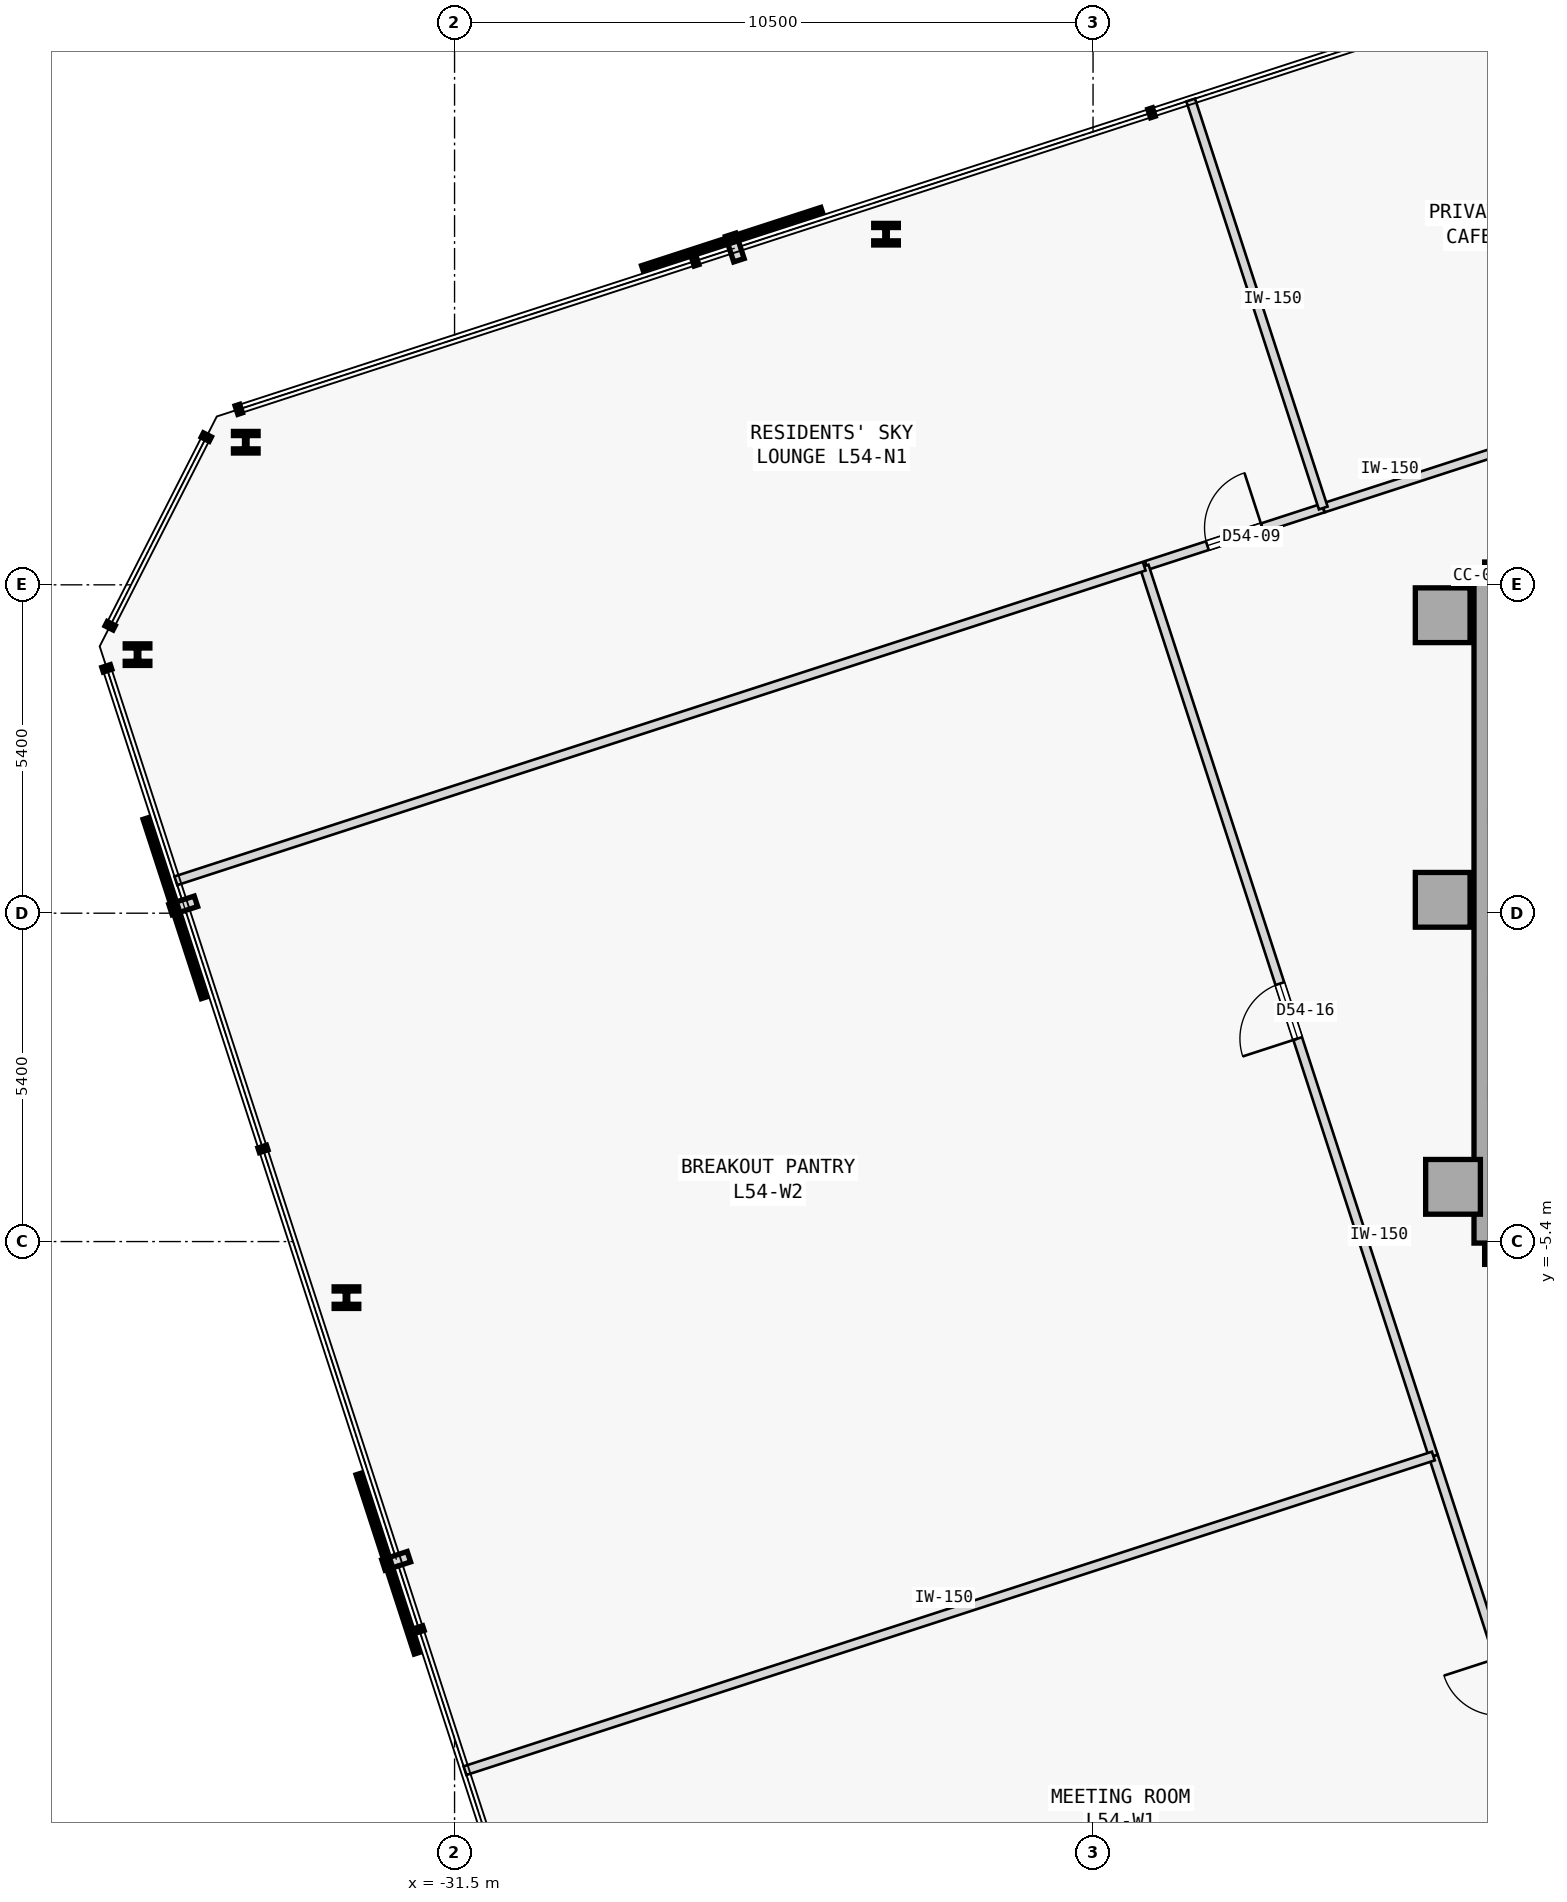
"""IFC4 building model, lengths in metres.
Left out: names, types, materials, properties, quantities, classifications, styles, units other than length and angle.
Written with IfcOpenShell. Run it as: python <this file> out.ifc"""

import sys

from ifc_helpers import new_model, si_unit, direction, frame, frame_2d, origin, origin_2d, place, context, subcontext, project, spatial, rectangle, i_section, extrude, element, fill, save


model = new_model("IFC4")
c1 = context("Model", 3, precision=1e-05, world=origin(), true_north=direction((0.0, 1.0)))
c2 = subcontext(c1, "Body", "Model", "MODEL_VIEW")
j1 = project(units=[si_unit("LENGTHUNIT", "METRE"), si_unit("PLANEANGLEUNIT", "RADIAN")], contexts=[c1])
p1 = place(None, origin())
s1 = spatial("IfcSite", under=j1, at=p1, CompositionType="ELEMENT")
p2 = place(p1, origin())
s2 = spatial("IfcBuilding", under=s1, at=p2, CompositionType="ELEMENT")
p3 = place(p2, frame((0.0, 0.0, 206.8)))
s3 = spatial("IfcBuildingStorey", under=s2, at=p3, CompositionType="ELEMENT", Elevation=206.8)
for number, where, z_axis, x_axis in (
    (1, (-15.25, 4.9, 0.0), (0.0, 0.0, 1.0), (1.0, 0.0, 0.0)),
    (2, (-15.25, 0.22, 0.0), (0.0, 0.0, 1.0), (1.0, 0.0, 0.0)),
    (3, (-15.08, -4.5, 0.0), (0.0, 0.0, 1.0), (1.0, 0.0, 0.0)),
):
    element("IfcColumn", number, at=place(p3, frame(where, z_axis=z_axis, x_axis=x_axis)), inside=s3, PredefinedType="COLUMN", context=c2, shape_type="SweptSolid", body=[
        extrude(rectangle(XDim=0.9, YDim=0.9, at=origin_2d()), origin(), (0.0, 0.0, 1.0), 4.1),
    ])
p4 = place(p3, frame((-14.56, 5.6, 0.0), z_axis=(0.0, 0.0, 1.0), x_axis=(1.0, 0.0, 0.0)))
e4 = element("IfcWall", 4, at=p4, inside=s3, PredefinedType="SHEAR", context=c2, shape_type="SweptSolid", body=[
    extrude(rectangle(XDim=11.41, YDim=0.35, at=frame_2d((5.705, 0.0))), origin(), (0.0, 0.0, 1.0), 3.875),
])
p5 = place(p3, frame((-14.56, -5.6, 0.0), z_axis=(0.0, 0.0, 1.0), x_axis=(1.0, 0.0, 0.0)))
e5 = element("IfcWall", 5, at=p5, inside=s3, PredefinedType="SHEAR", context=c2, shape_type="SweptSolid", body=[
    extrude(rectangle(XDim=10.86, YDim=0.35, at=frame_2d((5.43, 0.0))), origin(), (0.0, 0.0, 1.0), 3.875),
])
p6 = place(p3, frame((-14.56, -5.425, 0.0), z_axis=(0.0, 0.0, 1.0), x_axis=(0.0, 1.0, 0.0)))
e6 = element("IfcWall", 6, at=p6, inside=s3, PredefinedType="SHEAR", context=c2, shape_type="SweptSolid", body=[
    extrude(rectangle(XDim=10.85, YDim=0.35, at=frame_2d((5.425, 0.0))), origin(), (0.0, 0.0, 1.0), 3.875),
])
for number, where, z_axis, x_axis in (
    (7, (-24.404, 11.166, 0.0), (0.0, 0.0, 1.0), (1.0, 0.0, 0.0)),
    (8, (-34.934, 7.745, 0.0), (0.0, 0.0, 1.0), (1.0, 0.0, 0.0)),
    (9, (-36.713, 4.252, 0.0), (0.0, 0.0, 1.0), (1.0, 0.0, 0.0)),
    (10, (-33.278, -6.322, 0.0), (0.0, 0.0, 1.0), (1.0, 0.0, 0.0)),
):
    element("IfcColumn", number, at=place(p3, frame(where, z_axis=z_axis, x_axis=x_axis)), inside=s3, PredefinedType="COLUMN", context=c2, shape_type="SweptSolid", body=[
        extrude(i_section(OverallWidth=0.405, OverallDepth=0.355, WebThickness=0.042, FlangeThickness=0.068, FilletRadius=0.015, at=origin_2d()), origin(), (0.0, 0.0, 1.0), 4.1),
    ])
p7 = place(p3, frame((-20.123, 5.719, 0.0), z_axis=(0.0, 0.0, 1.0), x_axis=(0.95105108089, 0.309033722331, 0.0)))
e11 = element("IfcWall", 11, at=p7, inside=s3, PredefinedType="PARTITIONING", context=c2, shape_type="SweptSolid", body=[
    extrude(rectangle(XDim=3.058, YDim=0.15, at=frame_2d((1.529, 0.0))), origin(), (0.0, 0.0, 1.0), 3.875),
])
p8 = place(p7, frame((1.054, 0.0, 0.0)))
e12 = element("IfcOpeningElement", 12, at=p8, cuts=e11, PredefinedType="OPENING", context=c2, shape_type="SweptSolid", body=[
    extrude(rectangle(XDim=0.95, YDim=2.15, at=frame_2d((0.475, 1.075))), frame((0.0, 0.085, 0.0), z_axis=(0.0, -1.0, 0.0), x_axis=(1.0, 0.0, 0.0)), (0.0, 0.0, 1.0), 0.17),
])
p9 = place(p3, frame((-17.214, 6.664, 0.0), z_axis=(0.0, 0.0, 1.0), x_axis=(0.951056894815, 0.309015829409, 0.0)))
e13 = element("IfcWall", 13, at=p9, inside=s3, PredefinedType="PARTITIONING", context=c2, shape_type="SweptSolid", body=[
    extrude(rectangle(XDim=22.32, YDim=0.15, at=frame_2d((11.16, 0.0))), origin(), (0.0, 0.0, 1.0), 3.875),
])
p10 = place(p9, frame((10.685, 0.0, 0.0)))
e14 = element("IfcOpeningElement", 14, at=p10, cuts=e13, PredefinedType="OPENING", context=c2, shape_type="SweptSolid", body=[
    extrude(rectangle(XDim=0.95, YDim=2.15, at=frame_2d((0.475, 1.075))), frame((0.0, 0.085, 0.0), z_axis=(0.0, -1.0, 0.0), x_axis=(1.0, 0.0, 0.0)), (0.0, 0.0, 1.0), 0.17),
])
p11 = place(p3, frame((-12.954, -16.466, 0.0), z_axis=(0.0, 0.0, 1.0), x_axis=(-0.309039411751, 0.951049232156, 0.0)))
e15 = element("IfcWall", 15, at=p11, inside=s3, PredefinedType="PARTITIONING", context=c2, shape_type="SweptSolid", body=[
    extrude(rectangle(XDim=7.927, YDim=0.15, at=frame_2d((3.963, 0.0))), origin(), (0.0, 0.0, 1.0), 3.875),
])
p12 = place(p11, frame((3.489, 0.0, 0.0)))
e16 = element("IfcOpeningElement", 16, at=p12, cuts=e15, PredefinedType="OPENING", context=c2, shape_type="SweptSolid", body=[
    extrude(rectangle(XDim=0.95, YDim=2.15, at=frame_2d((0.475, 1.075))), frame((0.0, 0.085, 0.0), z_axis=(0.0, -1.0, 0.0), x_axis=(1.0, 0.0, 0.0)), (0.0, 0.0, 1.0), 0.17),
])
p13 = place(p3, frame((-15.404, -8.927, 0.0), z_axis=(0.0, 0.0, 1.0), x_axis=(-0.309002477631, 0.951061232949, 0.0)))
e17 = element("IfcWall", 17, at=p13, inside=s3, PredefinedType="PARTITIONING", context=c2, shape_type="SweptSolid", body=[
    extrude(rectangle(XDim=15.387, YDim=0.15, at=frame_2d((7.693, 0.0))), origin(), (0.0, 0.0, 1.0), 3.875),
])
p14 = place(p13, frame((7.219, 0.0, 0.0)))
e18 = element("IfcOpeningElement", 18, at=p14, cuts=e17, PredefinedType="OPENING", context=c2, shape_type="SweptSolid", body=[
    extrude(rectangle(XDim=0.95, YDim=2.15, at=frame_2d((0.475, 1.075))), frame((0.0, 0.085, 0.0), z_axis=(0.0, -1.0, 0.0), x_axis=(1.0, 0.0, 0.0)), (0.0, 0.0, 1.0), 0.17),
])
p15 = place(p3, frame((-17.214, 6.664, 0.0), z_axis=(0.0, 0.0, 1.0), x_axis=(-0.30900233296, 0.951061279953, 0.0)))
e19 = element("IfcWall", 19, at=p15, inside=s3, PredefinedType="PARTITIONING", context=c2, shape_type="SweptSolid", body=[
    extrude(rectangle(XDim=7.054, YDim=0.15, at=frame_2d((3.527, 0.0))), origin(), (0.0, 0.0, 1.0), 3.875),
])
p16 = place(p3, frame((-36.083, 0.533, 0.0), z_axis=(0.0, 0.0, 1.0), x_axis=(0.95105881752, 0.309009911842, 0.0)))
e20 = element("IfcWall", 20, at=p16, inside=s3, PredefinedType="PARTITIONING", context=c2, shape_type="SweptSolid", body=[
    extrude(rectangle(XDim=16.744, YDim=0.15, at=frame_2d((8.372, 0.0))), origin(), (0.0, 0.0, 1.0), 3.875),
])
p17 = place(p3, frame((-31.328, -14.101, 0.0), z_axis=(0.0, 0.0, 1.0), x_axis=(0.951057425217, 0.309014196986, 0.0)))
e21 = element("IfcWall", 21, at=p17, inside=s3, PredefinedType="PARTITIONING", context=c2, shape_type="SweptSolid", body=[
    extrude(rectangle(XDim=16.744, YDim=0.15, at=frame_2d((8.372, 0.0))), origin(), (0.0, 0.0, 1.0), 3.875),
])
p18 = place(p8, origin())
e22 = element("IfcDoor", 22, at=p18, inside=s3, OperationType="SINGLE_SWING_RIGHT", PredefinedType="DOOR", context=c2, shape_type="SweptSolid", body=[
    extrude(rectangle(XDim=0.95, YDim=2.15, at=frame_2d((0.475, 1.075))), frame((0.0, 0.025, 0.0), z_axis=(0.0, -1.0, 0.0), x_axis=(1.0, 0.0, 0.0)), (0.0, 0.0, 1.0), 0.05),
])
fill(e12, e22)
p19 = place(p14, origin())
e23 = element("IfcDoor", 23, at=p19, inside=s3, OperationType="SINGLE_SWING_LEFT", PredefinedType="DOOR", context=c2, shape_type="SweptSolid", body=[
    extrude(rectangle(XDim=0.95, YDim=2.15, at=frame_2d((0.475, 1.075))), frame((0.0, 0.025, 0.0), z_axis=(0.0, -1.0, 0.0), x_axis=(1.0, 0.0, 0.0)), (0.0, 0.0, 1.0), 0.05),
])
fill(e18, e23)
save(model, sys.argv[1])
